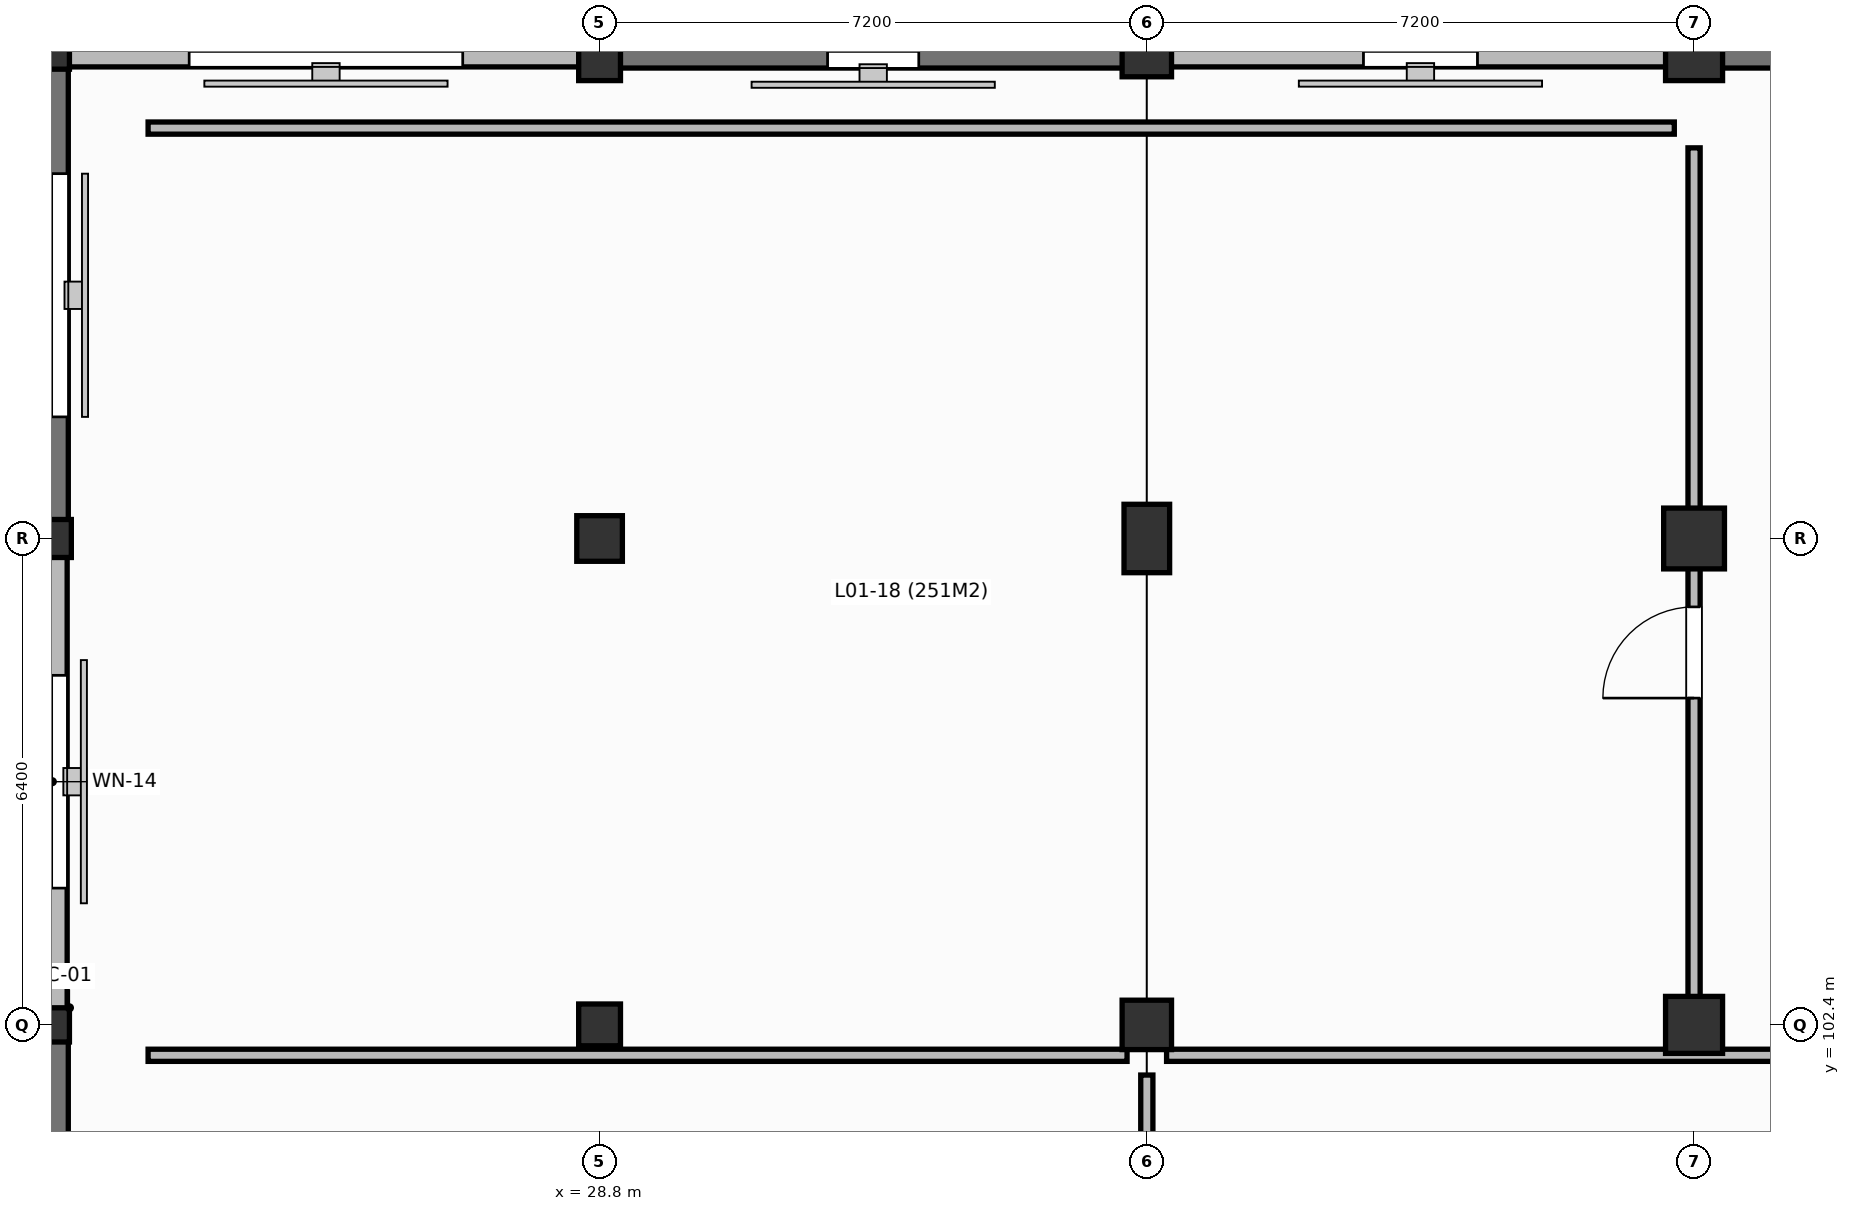
"""IFC4 building model, lengths in metres.
Left out: names, types, materials, properties, quantities, classifications, styles, units other than length and angle.
Written with IfcOpenShell. Run it as: python <this file> out.ifc"""

import sys

from ifc_helpers import new_model, si_unit, direction, frame, frame_2d, origin, origin_2d, place, context, subcontext, project, spatial, rectangle, extrude, element, fill, save


model = new_model("IFC4")
c1 = context("Model", 3, precision=1e-05, world=origin(), true_north=direction((0.0, 1.0)))
c2 = subcontext(c1, "Body", "Model", "MODEL_VIEW")
j1 = project(units=[si_unit("LENGTHUNIT", "METRE"), si_unit("PLANEANGLEUNIT", "RADIAN")], contexts=[c1])
p1 = place(None, origin())
s1 = spatial("IfcSite", under=j1, at=p1, CompositionType="ELEMENT")
p2 = place(p1, origin())
s2 = spatial("IfcBuilding", under=s1, at=p2, CompositionType="ELEMENT")
p3 = place(p2, frame((0.0, 0.0, 4.8)))
s3 = spatial("IfcBuildingStorey", under=s2, at=p3, CompositionType="ELEMENT", Elevation=4.8)
p4 = place(p3, frame((21.6, 102.4, 0.0), z_axis=(0.0, 0.0, 1.0), x_axis=(1.0, 0.0, 0.0)))
e1 = element("IfcColumn", 1, at=p4, inside=s3, PredefinedType="COLUMN", context=c2, shape_type="SweptSolid", body=[
    extrude(rectangle(XDim=0.45, YDim=0.45, at=origin_2d()), origin(), (0.0, 0.0, 1.0), 4.2),
])
p5 = place(p3, frame((21.6, 108.8, 0.0), z_axis=(0.0, 0.0, 1.0), x_axis=(1.0, 0.0, 0.0)))
e2 = element("IfcColumn", 2, at=p5, inside=s3, PredefinedType="COLUMN", context=c2, shape_type="SweptSolid", body=[
    extrude(rectangle(XDim=0.5, YDim=0.5, at=origin_2d()), origin(), (0.0, 0.0, 1.0), 4.2),
])
p6 = place(p3, frame((21.6, 115.2, 0.0), z_axis=(0.0, 0.0, 1.0), x_axis=(1.0, 0.0, 0.0)))
e3 = element("IfcColumn", 3, at=p6, inside=s3, PredefinedType="COLUMN", context=c2, shape_type="SweptSolid", body=[
    extrude(rectangle(XDim=0.45, YDim=0.45, at=origin_2d()), origin(), (0.0, 0.0, 1.0), 4.2),
])
p7 = place(p3, frame((28.8, 102.4, 0.0), z_axis=(0.0, 0.0, 1.0), x_axis=(1.0, 0.0, 0.0)))
e4 = element("IfcColumn", 4, at=p7, inside=s3, PredefinedType="COLUMN", context=c2, shape_type="SweptSolid", body=[
    extrude(rectangle(XDim=0.55, YDim=0.55, at=origin_2d()), origin(), (0.0, 0.0, 1.0), 4.2),
])
p8 = place(p3, frame((28.8, 108.8, 0.0), z_axis=(0.0, 0.0, 1.0), x_axis=(1.0, 0.0, 0.0)))
e5 = element("IfcColumn", 5, at=p8, inside=s3, PredefinedType="COLUMN", context=c2, shape_type="SweptSolid", body=[
    extrude(rectangle(XDim=0.6, YDim=0.6, at=origin_2d()), origin(), (0.0, 0.0, 1.0), 4.2),
])
p9 = place(p3, frame((28.8, 115.2, 0.0), z_axis=(0.0, 0.0, 1.0), x_axis=(1.0, 0.0, 0.0)))
e6 = element("IfcColumn", 6, at=p9, inside=s3, PredefinedType="COLUMN", context=c2, shape_type="SweptSolid", body=[
    extrude(rectangle(XDim=0.55, YDim=0.75, at=origin_2d()), origin(), (0.0, 0.0, 1.0), 4.2),
])
p10 = place(p3, frame((36.0, 102.4, 0.0), z_axis=(0.0, 0.0, 1.0), x_axis=(1.0, 0.0, 0.0)))
e7 = element("IfcColumn", 7, at=p10, inside=s3, PredefinedType="COLUMN", context=c2, shape_type="SweptSolid", body=[
    extrude(rectangle(XDim=0.65, YDim=0.65, at=origin_2d()), origin(), (0.0, 0.0, 1.0), 4.2),
])
p11 = place(p3, frame((36.0, 108.8, 0.0), z_axis=(0.0, 0.0, 1.0), x_axis=(1.0, 0.0, 0.0)))
e8 = element("IfcColumn", 8, at=p11, inside=s3, PredefinedType="COLUMN", context=c2, shape_type="SweptSolid", body=[
    extrude(rectangle(XDim=0.6, YDim=0.9, at=origin_2d()), origin(), (0.0, 0.0, 1.0), 4.2),
])
p12 = place(p3, frame((36.0, 115.2, 0.0), z_axis=(0.0, 0.0, 1.0), x_axis=(1.0, 0.0, 0.0)))
e9 = element("IfcColumn", 9, at=p12, inside=s3, PredefinedType="COLUMN", context=c2, shape_type="SweptSolid", body=[
    extrude(rectangle(XDim=0.65, YDim=0.65, at=origin_2d()), origin(), (0.0, 0.0, 1.0), 4.2),
])
p13 = place(p3, frame((43.2, 102.4, 0.0), z_axis=(0.0, 0.0, 1.0), x_axis=(1.0, 0.0, 0.0)))
e10 = element("IfcColumn", 10, at=p13, inside=s3, PredefinedType="COLUMN", context=c2, shape_type="SweptSolid", body=[
    extrude(rectangle(XDim=0.75, YDim=0.75, at=origin_2d()), origin(), (0.0, 0.0, 1.0), 4.2),
])
p14 = place(p3, frame((43.2, 108.8, 0.0), z_axis=(0.0, 0.0, 1.0), x_axis=(1.0, 0.0, 0.0)))
e11 = element("IfcColumn", 11, at=p14, inside=s3, PredefinedType="COLUMN", context=c2, shape_type="SweptSolid", body=[
    extrude(rectangle(XDim=0.8, YDim=0.8, at=origin_2d()), origin(), (0.0, 0.0, 1.0), 4.2),
])
p15 = place(p3, frame((43.2, 115.2, 0.0), z_axis=(0.0, 0.0, 1.0), x_axis=(1.0, 0.0, 0.0)))
e12 = element("IfcColumn", 12, at=p15, inside=s3, PredefinedType="COLUMN", context=c2, shape_type="SweptSolid", body=[
    extrude(rectangle(XDim=0.75, YDim=0.75, at=origin_2d()), origin(), (0.0, 0.0, 1.0), 4.2),
])
p16 = place(p3, frame((21.6, 96.0, 0.0), z_axis=(0.0, 0.0, 1.0), x_axis=(0.0, 1.0, 0.0)))
e13 = element("IfcWall", 13, at=p16, inside=s3, PredefinedType="STANDARD", context=c2, shape_type="SweptSolid", body=[
    extrude(rectangle(XDim=6.4, YDim=0.42, at=frame_2d((3.2, 0.0))), origin(), (0.0, 0.0, 1.0), 3.84),
])
p17 = place(p16, frame((2.0, 0.0, 0.8)))
e14 = element("IfcOpeningElement", 14, at=p17, cuts=e13, PredefinedType="OPENING", context=c2, shape_type="SweptSolid", body=[
    extrude(rectangle(XDim=2.4, YDim=1.45, at=frame_2d((1.2, 0.725))), frame((0.0, 0.22, 0.0), z_axis=(0.0, -1.0, 0.0), x_axis=(1.0, 0.0, 0.0)), (0.0, 0.0, 1.0), 0.44),
])
p18 = place(p3, frame((21.6, 102.4, 0.0), z_axis=(0.0, 0.0, 1.0), x_axis=(0.0, 1.0, 0.0)))
e15 = element("IfcWall", 15, at=p18, inside=s3, PredefinedType="STANDARD", context=c2, shape_type="SweptSolid", body=[
    extrude(rectangle(XDim=6.4, YDim=0.39, at=frame_2d((3.2, 0.0))), origin(), (0.0, 0.0, 1.0), 2.74),
])
p19 = place(p18, frame((1.8, 0.0, 0.8)))
e16 = element("IfcOpeningElement", 16, at=p19, cuts=e15, PredefinedType="OPENING", context=c2, shape_type="SweptSolid", body=[
    extrude(rectangle(XDim=2.8, YDim=1.6, at=frame_2d((1.4, 0.8))), frame((0.0, 0.205, 0.0), z_axis=(0.0, -1.0, 0.0), x_axis=(1.0, 0.0, 0.0)), (0.0, 0.0, 1.0), 0.41),
])
p20 = place(p3, frame((21.6, 108.8, 0.0), z_axis=(0.0, 0.0, 1.0), x_axis=(0.0, 1.0, 0.0)))
e17 = element("IfcWall", 17, at=p20, inside=s3, PredefinedType="STANDARD", context=c2, shape_type="SweptSolid", body=[
    extrude(rectangle(XDim=6.4, YDim=0.42, at=frame_2d((3.2, 0.0))), origin(), (0.0, 0.0, 1.0), 3.84),
])
p21 = place(p20, frame((1.6, 0.0, 0.8)))
e18 = element("IfcOpeningElement", 18, at=p21, cuts=e17, PredefinedType="OPENING", context=c2, shape_type="SweptSolid", body=[
    extrude(rectangle(XDim=3.2, YDim=1.6, at=frame_2d((1.6, 0.8))), frame((0.0, 0.22, 0.0), z_axis=(0.0, -1.0, 0.0), x_axis=(1.0, 0.0, 0.0)), (0.0, 0.0, 1.0), 0.44),
])
p22 = place(p3, frame((21.6, 115.2, 0.0), z_axis=(0.0, 0.0, 1.0), x_axis=(1.0, 0.0, 0.0)))
e19 = element("IfcWall", 19, at=p22, inside=s3, PredefinedType="STANDARD", context=c2, shape_type="SweptSolid", body=[
    extrude(rectangle(XDim=7.2, YDim=0.39, at=frame_2d((3.6, 0.0))), origin(), (0.0, 0.0, 1.0), 3.29),
])
p23 = place(p22, frame((1.8, 0.0, 0.8)))
e20 = element("IfcOpeningElement", 20, at=p23, cuts=e19, PredefinedType="OPENING", context=c2, shape_type="SweptSolid", body=[
    extrude(rectangle(XDim=3.6, YDim=1.6, at=frame_2d((1.8, 0.8))), frame((0.0, 0.205, 0.0), z_axis=(0.0, -1.0, 0.0), x_axis=(1.0, 0.0, 0.0)), (0.0, 0.0, 1.0), 0.41),
])
p24 = place(p3, frame((28.8, 115.2, 0.0), z_axis=(0.0, 0.0, 1.0), x_axis=(1.0, 0.0, 0.0)))
e21 = element("IfcWall", 21, at=p24, inside=s3, PredefinedType="STANDARD", context=c2, shape_type="SweptSolid", body=[
    extrude(rectangle(XDim=7.2, YDim=0.42, at=frame_2d((3.6, 0.0))), origin(), (0.0, 0.0, 1.0), 3.84),
])
p25 = place(p24, frame((3.0, 0.0, 0.8)))
e22 = element("IfcOpeningElement", 22, at=p25, cuts=e21, PredefinedType="OPENING", context=c2, shape_type="SweptSolid", body=[
    extrude(rectangle(XDim=1.2, YDim=1.65, at=frame_2d((0.6, 0.825))), frame((0.0, 0.22, 0.0), z_axis=(0.0, -1.0, 0.0), x_axis=(1.0, 0.0, 0.0)), (0.0, 0.0, 1.0), 0.44),
])
p26 = place(p3, frame((36.0, 115.2, 0.0), z_axis=(0.0, 0.0, 1.0), x_axis=(1.0, 0.0, 0.0)))
e23 = element("IfcWall", 23, at=p26, inside=s3, PredefinedType="STANDARD", context=c2, shape_type="SweptSolid", body=[
    extrude(rectangle(XDim=7.2, YDim=0.39, at=frame_2d((3.6, 0.0))), origin(), (0.0, 0.0, 1.0), 3.29),
])
p27 = place(p26, frame((2.85, 0.0, 0.8)))
e24 = element("IfcOpeningElement", 24, at=p27, cuts=e23, PredefinedType="OPENING", context=c2, shape_type="SweptSolid", body=[
    extrude(rectangle(XDim=1.5, YDim=1.65, at=frame_2d((0.75, 0.825))), frame((0.0, 0.205, 0.0), z_axis=(0.0, -1.0, 0.0), x_axis=(1.0, 0.0, 0.0)), (0.0, 0.0, 1.0), 0.41),
])
p28 = place(p3, frame((43.2, 115.2, 0.0), z_axis=(0.0, 0.0, 1.0), x_axis=(1.0, 0.0, 0.0)))
e25 = element("IfcWall", 25, at=p28, inside=s3, PredefinedType="STANDARD", context=c2, shape_type="SweptSolid", body=[
    extrude(rectangle(XDim=7.2, YDim=0.42, at=frame_2d((3.6, 0.0))), origin(), (0.0, 0.0, 1.0), 3.84),
])
p29 = place(p28, frame((2.7, 0.0, 0.8)))
e26 = element("IfcOpeningElement", 26, at=p29, cuts=e25, PredefinedType="OPENING", context=c2, shape_type="SweptSolid", body=[
    extrude(rectangle(XDim=1.8, YDim=1.65, at=frame_2d((0.9, 0.825))), frame((0.0, 0.22, 0.0), z_axis=(0.0, -1.0, 0.0), x_axis=(1.0, 0.0, 0.0)), (0.0, 0.0, 1.0), 0.44),
])
p30 = place(p3, frame((36.0, 90.06, 0.0), z_axis=(0.0, 0.0, 1.0), x_axis=(0.0, 1.0, 0.0)))
e27 = element("IfcWall", 27, at=p30, inside=s3, PredefinedType="PARTITIONING", context=c2, shape_type="SweptSolid", body=[
    extrude(rectangle(XDim=11.68, YDim=0.16, at=frame_2d((5.84, 0.0))), origin(), (0.0, 0.0, 1.0), 2.665),
])
p31 = place(p3, frame((35.74, 102.0, 0.0), z_axis=(0.0, 0.0, 1.0), x_axis=(-1.0, 0.0, 0.0)))
e28 = element("IfcWall", 28, at=p31, inside=s3, PredefinedType="PARTITIONING", context=c2, shape_type="SweptSolid", body=[
    extrude(rectangle(XDim=12.88, YDim=0.16, at=frame_2d((6.44, 0.0))), origin(), (0.0, 0.0, 1.0), 3.165),
])
p32 = place(p3, frame((50.14, 102.0, 0.0), z_axis=(0.0, 0.0, 1.0), x_axis=(-1.0, 0.0, 0.0)))
e29 = element("IfcWall", 29, at=p32, inside=s3, PredefinedType="PARTITIONING", context=c2, shape_type="SweptSolid", body=[
    extrude(rectangle(XDim=13.88, YDim=0.16, at=frame_2d((6.94, 0.0))), origin(), (0.0, 0.0, 1.0), 3.065),
])
p33 = place(p3, frame((43.2, 102.26, 0.0), z_axis=(0.0, 0.0, 1.0), x_axis=(0.0, 1.0, 0.0)))
e30 = element("IfcWall", 30, at=p33, inside=s3, PredefinedType="PARTITIONING", context=c2, shape_type="SweptSolid", body=[
    extrude(rectangle(XDim=11.68, YDim=0.16, at=frame_2d((5.84, 0.0))), origin(), (0.0, 0.0, 1.0), 2.615),
])
p34 = place(p33, frame((4.44, 0.0, 0.0)))
e31 = element("IfcOpeningElement", 31, at=p34, cuts=e30, PredefinedType="OPENING", context=c2, shape_type="SweptSolid", body=[
    extrude(rectangle(XDim=1.2, YDim=2.15, at=frame_2d((0.6, 1.075))), frame((0.0, 0.09, 0.0), z_axis=(0.0, -1.0, 0.0), x_axis=(1.0, 0.0, 0.0)), (0.0, 0.0, 1.0), 0.18),
])
p35 = place(p3, frame((42.94, 114.2, 0.0), z_axis=(0.0, 0.0, 1.0), x_axis=(-1.0, 0.0, 0.0)))
e32 = element("IfcWall", 32, at=p35, inside=s3, PredefinedType="PARTITIONING", context=c2, shape_type="SweptSolid", body=[
    extrude(rectangle(XDim=20.08, YDim=0.16, at=frame_2d((10.04, 0.0))), origin(), (0.0, 0.0, 1.0), 3.84),
])
p36 = place(p19, origin())
e33 = element("IfcWindow", 33, at=p36, inside=s3, PartitioningType="TRIPLE_PANEL_VERTICAL", PredefinedType="WINDOW", context=c2, shape_type="SweptSolid", body=[
    extrude(rectangle(XDim=2.8, YDim=1.6, at=frame_2d((1.4, 0.8))), frame((0.0, 0.03, 0.0), z_axis=(0.0, -1.0, 0.0), x_axis=(1.0, 0.0, 0.0)), (0.0, 0.0, 1.0), 0.06),
])
fill(e16, e33)
p37 = place(p21, origin())
e34 = element("IfcWindow", 34, at=p37, inside=s3, PartitioningType="TRIPLE_PANEL_VERTICAL", PredefinedType="WINDOW", context=c2, shape_type="SweptSolid", body=[
    extrude(rectangle(XDim=3.2, YDim=1.6, at=frame_2d((1.6, 0.8))), frame((0.0, 0.03, 0.0), z_axis=(0.0, -1.0, 0.0), x_axis=(1.0, 0.0, 0.0)), (0.0, 0.0, 1.0), 0.06),
])
fill(e18, e34)
p38 = place(p23, origin())
e35 = element("IfcWindow", 35, at=p38, inside=s3, PartitioningType="TRIPLE_PANEL_VERTICAL", PredefinedType="WINDOW", context=c2, shape_type="SweptSolid", body=[
    extrude(rectangle(XDim=3.6, YDim=1.6, at=frame_2d((1.8, 0.8))), frame((0.0, 0.03, 0.0), z_axis=(0.0, -1.0, 0.0), x_axis=(1.0, 0.0, 0.0)), (0.0, 0.0, 1.0), 0.06),
])
fill(e20, e35)
p39 = place(p25, origin())
e36 = element("IfcWindow", 36, at=p39, inside=s3, PartitioningType="SINGLE_PANEL", PredefinedType="WINDOW", context=c2, shape_type="SweptSolid", body=[
    extrude(rectangle(XDim=1.2, YDim=1.65, at=frame_2d((0.6, 0.825))), frame((0.0, 0.03, 0.0), z_axis=(0.0, -1.0, 0.0), x_axis=(1.0, 0.0, 0.0)), (0.0, 0.0, 1.0), 0.06),
])
fill(e22, e36)
p40 = place(p27, origin())
e37 = element("IfcWindow", 37, at=p40, inside=s3, PartitioningType="SINGLE_PANEL", PredefinedType="WINDOW", context=c2, shape_type="SweptSolid", body=[
    extrude(rectangle(XDim=1.5, YDim=1.65, at=frame_2d((0.75, 0.825))), frame((0.0, 0.03, 0.0), z_axis=(0.0, -1.0, 0.0), x_axis=(1.0, 0.0, 0.0)), (0.0, 0.0, 1.0), 0.06),
])
fill(e24, e37)
p41 = place(p34, origin())
e38 = element("IfcDoor", 38, at=p41, inside=s3, OperationType="SINGLE_SWING_LEFT", PredefinedType="DOOR", context=c2, shape_type="SweptSolid", body=[
    extrude(rectangle(XDim=1.2, YDim=2.15, at=frame_2d((0.6, 1.075))), frame((0.0, 0.025, 0.0), z_axis=(0.0, -1.0, 0.0), x_axis=(1.0, 0.0, 0.0)), (0.0, 0.0, 1.0), 0.05),
])
fill(e31, e38)
save(model, sys.argv[1])
